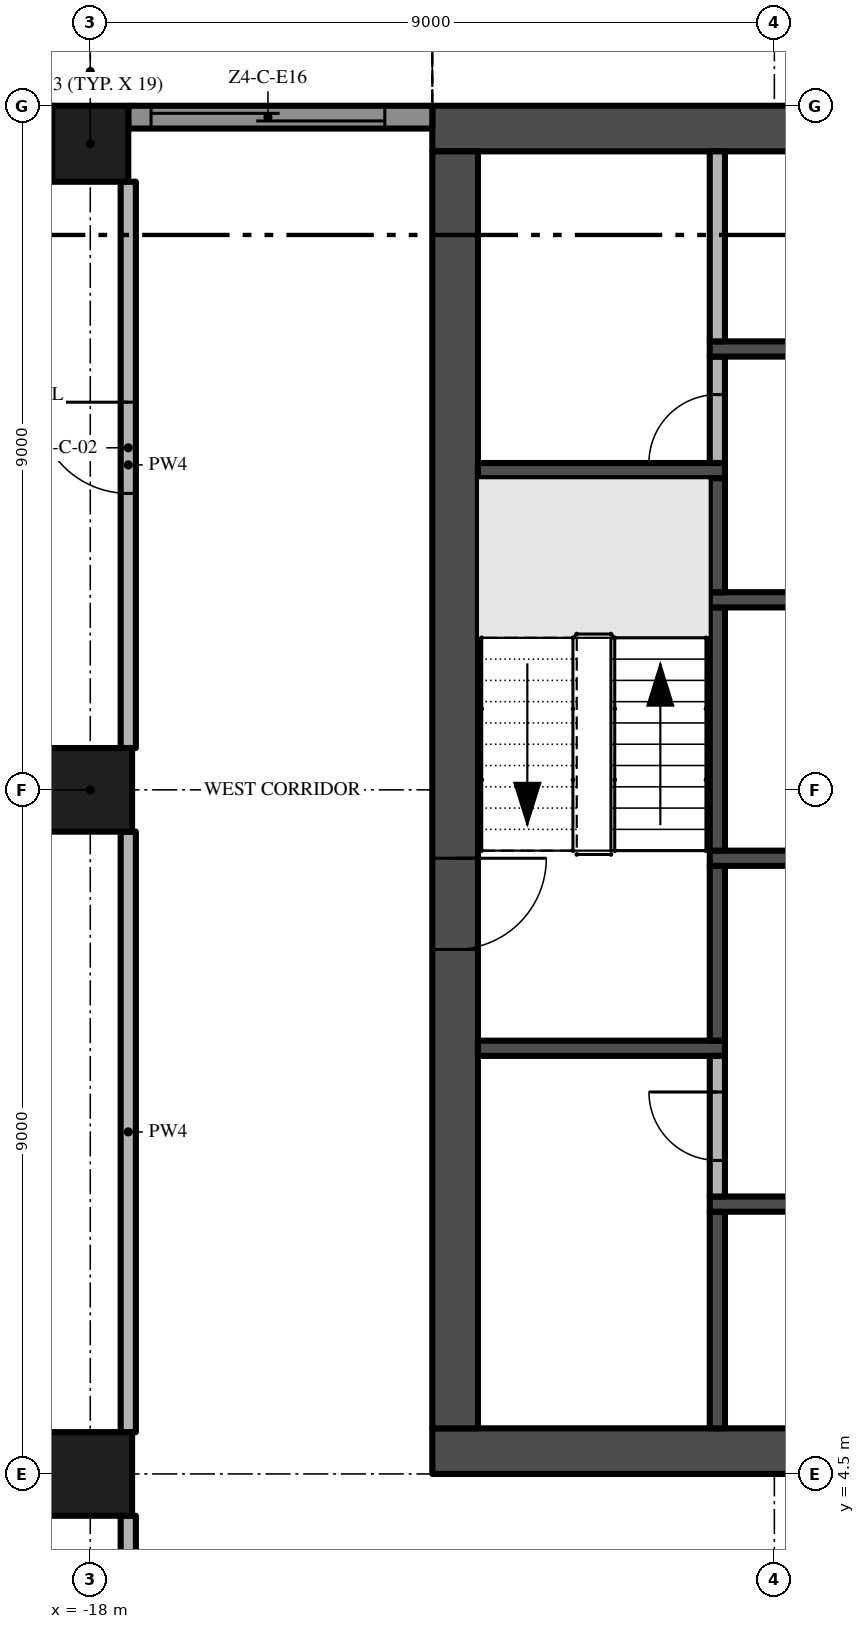
"""IFC4 building model, lengths in metres.
Left out: names, types, materials, properties, quantities, classifications, styles, units other than length and angle.
Written with IfcOpenShell. Run it as: python <this file> out.ifc"""

import sys

from ifc_helpers import new_model, si_unit, direction, frame, frame_2d, origin, origin_2d, place, context, subcontext, project, spatial, polyline, rectangle, outline, extrude, element, fill, save


model = new_model("IFC4")
c1 = context("Model", 3, precision=1e-05, world=origin(), true_north=direction((0.0, 1.0)))
c2 = subcontext(c1, "Body", "Model", "MODEL_VIEW")
j1 = project(units=[si_unit("LENGTHUNIT", "METRE"), si_unit("PLANEANGLEUNIT", "RADIAN")], contexts=[c1])
p1 = place(None, origin())
s1 = spatial("IfcSite", under=j1, at=p1, CompositionType="ELEMENT")
p2 = place(p1, origin())
s2 = spatial("IfcBuilding", under=s1, at=p2, CompositionType="ELEMENT")
p3 = place(p2, frame((0.0, 0.0, 214.8)))
s3 = spatial("IfcBuildingStorey", under=s2, at=p3, CompositionType="ELEMENT", Elevation=214.8)
p4 = place(p3, frame((-13.5, 4.8, -0.3), z_axis=(0.0, 0.0, 1.0), x_axis=(1.0, 0.0, 0.0)))
e1 = element("IfcWall", 1, at=p4, inside=s3, PredefinedType="SHEAR", context=c2, shape_type="SweptSolid", body=[
    extrude(rectangle(XDim=27.0, YDim=0.6, at=frame_2d((13.5, 0.0))), origin(), (0.0, 0.0, 1.0), 3.8),
])
p5 = place(p4, frame((12.0, 0.0, 0.3)))
e2 = element("IfcOpeningElement", 2, at=p5, cuts=e1, PredefinedType="OPENING", context=c2, shape_type="SweptSolid", body=[
    extrude(rectangle(XDim=3.0, YDim=2.4, at=frame_2d((1.5, 1.2))), frame((0.0, 0.31, 0.0), z_axis=(0.0, -1.0, 0.0), x_axis=(1.0, 0.0, 0.0)), (0.0, 0.0, 1.0), 0.62),
])
p6 = place(p4, frame((4.9, 0.0, 0.3)))
e3 = element("IfcOpeningElement", 3, at=p6, cuts=e1, PredefinedType="OPENING", context=c2, shape_type="SweptSolid", body=[
    extrude(rectangle(XDim=1.2, YDim=2.2, at=frame_2d((0.6, 1.1))), frame((0.0, 0.31, 0.0), z_axis=(0.0, -1.0, 0.0), x_axis=(1.0, 0.0, 0.0)), (0.0, 0.0, 1.0), 0.62),
])
p7 = place(p4, frame((20.75, 0.0, 0.3)))
e4 = element("IfcOpeningElement", 4, at=p7, cuts=e1, PredefinedType="OPENING", context=c2, shape_type="SweptSolid", body=[
    extrude(rectangle(XDim=1.5, YDim=2.2, at=frame_2d((0.75, 1.1))), frame((0.0, 0.31, 0.0), z_axis=(0.0, -1.0, 0.0), x_axis=(1.0, 0.0, 0.0)), (0.0, 0.0, 1.0), 0.62),
])
p8 = place(p4, frame((17.4, 0.0, 0.3)))
e5 = element("IfcOpeningElement", 5, at=p8, cuts=e1, PredefinedType="OPENING", context=c2, shape_type="SweptSolid", body=[
    extrude(rectangle(XDim=1.2, YDim=2.2, at=frame_2d((0.6, 1.1))), frame((0.0, 0.31, 0.0), z_axis=(0.0, -1.0, 0.0), x_axis=(1.0, 0.0, 0.0)), (0.0, 0.0, 1.0), 0.62),
])
p9 = place(p3, frame((13.5, 22.2, -0.3), z_axis=(0.0, 0.0, 1.0), x_axis=(-1.0, 0.0, 0.0)))
e6 = element("IfcWall", 6, at=p9, inside=s3, PredefinedType="SHEAR", context=c2, shape_type="SweptSolid", body=[
    extrude(rectangle(XDim=27.0, YDim=0.6, at=frame_2d((13.5, 0.0))), origin(), (0.0, 0.0, 1.0), 3.8),
])
p10 = place(p3, frame((-13.2, 21.9, -0.3), z_axis=(0.0, 0.0, 1.0), x_axis=(0.0, -1.0, 0.0)))
e7 = element("IfcWall", 7, at=p10, inside=s3, PredefinedType="SHEAR", context=c2, shape_type="SweptSolid", body=[
    extrude(rectangle(XDim=16.8, YDim=0.6, at=frame_2d((8.4, 0.0))), origin(), (0.0, 0.0, 1.0), 3.8),
])
p11 = place(p10, frame((9.3, 0.0, 0.3)))
e8 = element("IfcOpeningElement", 8, at=p11, cuts=e7, PredefinedType="OPENING", context=c2, shape_type="SweptSolid", body=[
    extrude(rectangle(XDim=1.2, YDim=2.2, at=frame_2d((0.6, 1.1))), frame((0.0, 0.31, 0.0), z_axis=(0.0, -1.0, 0.0), x_axis=(1.0, 0.0, 0.0)), (0.0, 0.0, 1.0), 0.62),
])
p12 = place(p3, frame((-18.0, 13.5, 0.0), z_axis=(0.0, 0.0, 1.0), x_axis=(1.0, 0.0, 0.0)))
e9 = element("IfcColumn", 9, at=p12, inside=s3, PredefinedType="COLUMN", context=c2, shape_type="SweptSolid", body=[
    extrude(rectangle(XDim=1.1, YDim=1.1, at=origin_2d()), origin(), (0.0, 0.0, 1.0), 3.5),
])
p13 = place(p3, frame((-18.0, 22.0, 0.0), z_axis=(0.0, 0.0, 1.0), x_axis=(1.0, 0.0, 0.0)))
e10 = element("IfcColumn", 10, at=p13, inside=s3, PredefinedType="COLUMN", context=c2, shape_type="SweptSolid", body=[
    extrude(rectangle(XDim=1.0, YDim=1.0, at=origin_2d()), origin(), (0.0, 0.0, 1.0), 3.5),
])
p14 = place(p3, frame((-18.0, 4.5, 0.0), z_axis=(0.0, 0.0, 1.0), x_axis=(1.0, 0.0, 0.0)))
e11 = element("IfcColumn", 11, at=p14, inside=s3, PredefinedType="COLUMN", context=c2, shape_type="SweptSolid", body=[
    extrude(rectangle(XDim=1.1, YDim=1.1, at=origin_2d()), origin(), (0.0, 0.0, 1.0), 3.5),
])
p15 = place(p3, frame((-17.5, 22.35, 0.0), z_axis=(0.0, 0.0, 1.0), x_axis=(1.0, 0.0, 0.0)))
e12 = element("IfcWall", 12, at=p15, inside=s3, PredefinedType="SOLIDWALL", context=c2, shape_type="SweptSolid", body=[
    extrude(rectangle(XDim=4.0, YDim=0.3, at=frame_2d((2.0, 0.0))), origin(), (0.0, 0.0, 1.0), 3.5),
])
p16 = place(p15, frame((0.3, 0.0, 0.0)))
e13 = element("IfcOpeningElement", 13, at=p16, cuts=e12, PredefinedType="OPENING", context=c2, shape_type="SweptSolid", body=[
    extrude(rectangle(XDim=3.075, YDim=2.4, at=frame_2d((1.538, 1.2))), frame((0.0, 0.16, 0.0), z_axis=(0.0, -1.0, 0.0), x_axis=(1.0, 0.0, 0.0)), (0.0, 0.0, 1.0), 0.32),
])
p17 = place(p3, origin())
e14 = element("IfcWall", 14, at=p17, inside=s3, PredefinedType="USERDEFINED", context=c2, shape_type="SweptSolid", body=[
    extrude(outline(polyline([(-13.5, 25.149), (-15.0, 25.485), (-15.375, 25.5), (-16.5, 25.369), (-18.0, 24.845), (-19.5, 24.112), (-21.0, 23.451), (-22.5, 23.115), (-22.445, 22.871), (-20.921, 23.213), (-19.395, 23.885), (-17.904, 24.614), (-16.444, 25.124), (-15.365, 25.249), (-15.033, 25.236), (-13.555, 24.905), (-13.5, 25.149)])), origin(), (0.0, 0.0, 1.0), 0.9),
])
for number, where, z_axis, x_axis in (
    (15, (-12.9, 10.1, 0.0), (0.0, 0.0, 1.0), (1.0, 0.0, 0.0)),
    (16, (-12.9, 17.7, 0.0), (0.0, 0.0, 1.0), (1.0, 0.0, 0.0)),
):
    element("IfcWall", number, at=place(p3, frame(where, z_axis=z_axis, x_axis=x_axis)), inside=s3, PredefinedType="SHEAR", context=c2, shape_type="SweptSolid", body=[
        extrude(rectangle(XDim=3.25, YDim=0.2, at=frame_2d((1.625, 0.0))), origin(), (0.0, 0.0, 1.0), 3.5),
    ])
p18 = place(p3, frame((-9.75, 5.1, 0.0), z_axis=(0.0, 0.0, 1.0), x_axis=(0.0, 1.0, 0.0)))
e17 = element("IfcWall", 17, at=p18, inside=s3, PredefinedType="SHEAR", context=c2, shape_type="SweptSolid", body=[
    extrude(rectangle(XDim=2.85, YDim=0.2, at=frame_2d((1.425, 0.0))), origin(), (0.0, 0.0, 1.0), 3.5),
])
p19 = place(p3, frame((-9.85, 8.05, 0.0), z_axis=(0.0, 0.0, 1.0), x_axis=(1.0, 0.0, 0.0)))
e18 = element("IfcWall", 18, at=p19, inside=s3, PredefinedType="SHEAR", context=c2, shape_type="SweptSolid", body=[
    extrude(rectangle(XDim=8.35, YDim=0.2, at=frame_2d((4.175, 0.0))), origin(), (0.0, 0.0, 1.0), 3.5),
])
p20 = place(p3, frame((-9.75, 8.15, 0.0), z_axis=(0.0, 0.0, 1.0), x_axis=(0.0, 1.0, 0.0)))
e19 = element("IfcWall", 19, at=p20, inside=s3, PredefinedType="PARTITIONING", context=c2, shape_type="SweptSolid", body=[
    extrude(rectangle(XDim=1.85, YDim=0.2, at=frame_2d((0.925, 0.0))), origin(), (0.0, 0.0, 1.0), 3.5),
])
p21 = place(p20, frame((0.475, 0.0, 0.0)))
e20 = element("IfcOpeningElement", 20, at=p21, cuts=e19, PredefinedType="OPENING", context=c2, shape_type="SweptSolid", body=[
    extrude(rectangle(XDim=0.9, YDim=2.1, at=frame_2d((0.45, 1.05))), frame((0.0, 0.11, 0.0), z_axis=(0.0, -1.0, 0.0), x_axis=(1.0, 0.0, 0.0)), (0.0, 0.0, 1.0), 0.22),
])
p22 = place(p3, frame((-9.75, 10.2, 0.0), z_axis=(0.0, 0.0, 1.0), x_axis=(0.0, 1.0, 0.0)))
e21 = element("IfcWall", 21, at=p22, inside=s3, PredefinedType="SHEAR", context=c2, shape_type="SweptSolid", body=[
    extrude(rectangle(XDim=2.3, YDim=0.2, at=frame_2d((1.15, 0.0))), origin(), (0.0, 0.0, 1.0), 3.5),
])
p23 = place(p3, frame((-9.85, 12.6, 0.0), z_axis=(0.0, 0.0, 1.0), x_axis=(1.0, 0.0, 0.0)))
e22 = element("IfcWall", 22, at=p23, inside=s3, PredefinedType="SHEAR", context=c2, shape_type="SweptSolid", body=[
    extrude(rectangle(XDim=3.475, YDim=0.2, at=frame_2d((1.738, 0.0))), origin(), (0.0, 0.0, 1.0), 3.5),
])
p24 = place(p3, frame((-9.75, 12.7, 0.0), z_axis=(0.0, 0.0, 1.0), x_axis=(0.0, 1.0, 0.0)))
e23 = element("IfcWall", 23, at=p24, inside=s3, PredefinedType="SHEAR", context=c2, shape_type="SweptSolid", body=[
    extrude(rectangle(XDim=3.2, YDim=0.2, at=frame_2d((1.6, 0.0))), origin(), (0.0, 0.0, 1.0), 3.5),
])
p25 = place(p3, frame((-1.5, 16.0, 0.0), z_axis=(0.0, 0.0, 1.0), x_axis=(-1.0, 0.0, 0.0)))
e24 = element("IfcWall", 24, at=p25, inside=s3, PredefinedType="SHEAR", context=c2, shape_type="SweptSolid", body=[
    extrude(rectangle(XDim=8.35, YDim=0.2, at=frame_2d((4.175, 0.0))), origin(), (0.0, 0.0, 1.0), 3.5),
])
p26 = place(p25, frame((6.162, 0.0, 0.0)))
e25 = element("IfcOpeningElement", 25, at=p26, cuts=e24, PredefinedType="OPENING", context=c2, shape_type="SweptSolid", body=[
    extrude(rectangle(XDim=0.9, YDim=2.1, at=frame_2d((0.45, 1.05))), frame((0.0, 0.11, 0.0), z_axis=(0.0, -1.0, 0.0), x_axis=(1.0, 0.0, 0.0)), (0.0, 0.0, 1.0), 0.22),
])
p27 = place(p3, frame((-9.75, 16.1, 0.0), z_axis=(0.0, 0.0, 1.0), x_axis=(0.0, 1.0, 0.0)))
e26 = element("IfcWall", 26, at=p27, inside=s3, PredefinedType="SHEAR", context=c2, shape_type="SweptSolid", body=[
    extrude(rectangle(XDim=1.5, YDim=0.2, at=frame_2d((0.75, 0.0))), origin(), (0.0, 0.0, 1.0), 3.5),
])
p28 = place(p3, frame((-9.75, 17.8, 0.0), z_axis=(0.0, 0.0, 1.0), x_axis=(0.0, 1.0, 0.0)))
e27 = element("IfcWall", 27, at=p28, inside=s3, PredefinedType="PARTITIONING", context=c2, shape_type="SweptSolid", body=[
    extrude(rectangle(XDim=1.4, YDim=0.2, at=frame_2d((0.7, 0.0))), origin(), (0.0, 0.0, 1.0), 3.5),
])
p29 = place(p28, origin())
e28 = element("IfcOpeningElement", 28, at=p29, cuts=e27, PredefinedType="OPENING", context=c2, shape_type="SweptSolid", body=[
    extrude(rectangle(XDim=0.9, YDim=2.1, at=frame_2d((0.45, 1.05))), frame((0.0, 0.11, 0.0), z_axis=(0.0, -1.0, 0.0), x_axis=(1.0, 0.0, 0.0)), (0.0, 0.0, 1.0), 0.22),
])
p30 = place(p3, frame((-9.85, 19.3, 0.0), z_axis=(0.0, 0.0, 1.0), x_axis=(1.0, 0.0, 0.0)))
e29 = element("IfcWall", 29, at=p30, inside=s3, PredefinedType="SHEAR", context=c2, shape_type="SweptSolid", body=[
    extrude(rectangle(XDim=19.7, YDim=0.2, at=frame_2d((9.85, 0.0))), origin(), (0.0, 0.0, 1.0), 3.5),
])
p31 = place(p30, frame((10.519, 0.0, 0.0)))
e30 = element("IfcOpeningElement", 30, at=p31, cuts=e29, PredefinedType="OPENING", context=c2, shape_type="SweptSolid", body=[
    extrude(rectangle(XDim=1.1, YDim=2.1, at=frame_2d((0.55, 1.05))), frame((0.0, 0.11, 0.0), z_axis=(0.0, -1.0, 0.0), x_axis=(1.0, 0.0, 0.0)), (0.0, 0.0, 1.0), 0.22),
])
p32 = place(p30, frame((12.956, 0.0, 0.0)))
e31 = element("IfcOpeningElement", 31, at=p32, cuts=e29, PredefinedType="OPENING", context=c2, shape_type="SweptSolid", body=[
    extrude(rectangle(XDim=1.1, YDim=2.1, at=frame_2d((0.55, 1.05))), frame((0.0, 0.11, 0.0), z_axis=(0.0, -1.0, 0.0), x_axis=(1.0, 0.0, 0.0)), (0.0, 0.0, 1.0), 0.22),
])
p33 = place(p30, frame((15.394, 0.0, 0.0)))
e32 = element("IfcOpeningElement", 32, at=p33, cuts=e29, PredefinedType="OPENING", context=c2, shape_type="SweptSolid", body=[
    extrude(rectangle(XDim=1.1, YDim=2.1, at=frame_2d((0.55, 1.05))), frame((0.0, 0.11, 0.0), z_axis=(0.0, -1.0, 0.0), x_axis=(1.0, 0.0, 0.0)), (0.0, 0.0, 1.0), 0.22),
])
p34 = place(p30, frame((17.831, 0.0, 0.0)))
e33 = element("IfcOpeningElement", 33, at=p34, cuts=e29, PredefinedType="OPENING", context=c2, shape_type="SweptSolid", body=[
    extrude(rectangle(XDim=1.1, YDim=2.1, at=frame_2d((0.55, 1.05))), frame((0.0, 0.11, 0.0), z_axis=(0.0, -1.0, 0.0), x_axis=(1.0, 0.0, 0.0)), (0.0, 0.0, 1.0), 0.22),
])
p35 = place(p30, frame((3.306, 0.0, 0.0)))
e34 = element("IfcOpeningElement", 34, at=p35, cuts=e29, PredefinedType="OPENING", context=c2, shape_type="SweptSolid", body=[
    extrude(rectangle(XDim=0.9, YDim=2.1, at=frame_2d((0.45, 1.05))), frame((0.0, 0.11, 0.0), z_axis=(0.0, -1.0, 0.0), x_axis=(1.0, 0.0, 0.0)), (0.0, 0.0, 1.0), 0.22),
])
p36 = place(p30, frame((8.181, 0.0, 0.0)))
e35 = element("IfcOpeningElement", 35, at=p36, cuts=e29, PredefinedType="OPENING", context=c2, shape_type="SweptSolid", body=[
    extrude(rectangle(XDim=0.9, YDim=2.1, at=frame_2d((0.45, 1.05))), frame((0.0, 0.11, 0.0), z_axis=(0.0, -1.0, 0.0), x_axis=(1.0, 0.0, 0.0)), (0.0, 0.0, 1.0), 0.22),
])
p37 = place(p3, frame((-9.75, 19.4, 0.0), z_axis=(0.0, 0.0, 1.0), x_axis=(0.0, 1.0, 0.0)))
e36 = element("IfcWall", 36, at=p37, inside=s3, PredefinedType="PARTITIONING", context=c2, shape_type="SweptSolid", body=[
    extrude(rectangle(XDim=2.5, YDim=0.2, at=frame_2d((1.25, 0.0))), origin(), (0.0, 0.0, 1.0), 3.5),
])
p38 = place(p3, frame((-17.5, -0.2, 0.0), z_axis=(0.0, 0.0, 1.0), x_axis=(0.0, 1.0, 0.0)))
e37 = element("IfcWall", 37, at=p38, inside=s3, PredefinedType="PARTITIONING", context=c2, shape_type="SweptSolid", body=[
    extrude(rectangle(XDim=4.15, YDim=0.2, at=frame_2d((2.075, 0.0))), origin(), (0.0, 0.0, 1.0), 3.5),
])
p39 = place(p3, frame((-17.5, 5.05, 0.0), z_axis=(0.0, 0.0, 1.0), x_axis=(0.0, 1.0, 0.0)))
e38 = element("IfcWall", 38, at=p39, inside=s3, PredefinedType="PARTITIONING", context=c2, shape_type="SweptSolid", body=[
    extrude(rectangle(XDim=7.9, YDim=0.2, at=frame_2d((3.95, 0.0))), origin(), (0.0, 0.0, 1.0), 3.5),
])
p40 = place(p3, frame((-17.5, 14.05, 0.0), z_axis=(0.0, 0.0, 1.0), x_axis=(0.0, 1.0, 0.0)))
e39 = element("IfcWall", 39, at=p40, inside=s3, PredefinedType="PARTITIONING", context=c2, shape_type="SweptSolid", body=[
    extrude(rectangle(XDim=7.45, YDim=0.2, at=frame_2d((3.725, 0.0))), origin(), (0.0, 0.0, 1.0), 3.5),
])
p41 = place(p40, frame((3.35, 0.0, 0.0)))
e40 = element("IfcOpeningElement", 40, at=p41, cuts=e39, PredefinedType="OPENING", context=c2, shape_type="SweptSolid", body=[
    extrude(rectangle(XDim=1.2, YDim=2.4, at=frame_2d((0.6, 1.2))), frame((0.0, 0.11, 0.0), z_axis=(0.0, -1.0, 0.0), x_axis=(1.0, 0.0, 0.0)), (0.0, 0.0, 1.0), 0.22),
])
p42 = place(p16, origin())
e41 = element("IfcDoor", 41, at=p42, inside=s3, OperationType="SINGLE_SWING_LEFT", PredefinedType="DOOR", context=c2, shape_type="SweptSolid", body=[
    extrude(rectangle(XDim=3.075, YDim=2.4, at=frame_2d((1.538, 1.2))), frame((0.0, 0.025, 0.0), z_axis=(0.0, -1.0, 0.0), x_axis=(1.0, 0.0, 0.0)), (0.0, 0.0, 1.0), 0.05),
])
fill(e13, e41)
p43 = place(p11, frame((1.2, 0.0, 0.0), z_axis=(0.0, 0.0, 1.0), x_axis=(-1.0, 0.0, 0.0)))
e42 = element("IfcDoor", 42, at=p43, inside=s3, OperationType="SINGLE_SWING_RIGHT", PredefinedType="DOOR", context=c2, shape_type="SweptSolid", body=[
    extrude(rectangle(XDim=1.2, YDim=2.2, at=frame_2d((0.6, 1.1))), frame((0.0, 0.025, 0.0), z_axis=(0.0, -1.0, 0.0), x_axis=(1.0, 0.0, 0.0)), (0.0, 0.0, 1.0), 0.05),
])
fill(e8, e42)
p44 = place(p29, origin())
e43 = element("IfcDoor", 43, at=p44, inside=s3, OperationType="SINGLE_SWING_LEFT", PredefinedType="DOOR", context=c2, shape_type="SweptSolid", body=[
    extrude(rectangle(XDim=0.9, YDim=2.1, at=frame_2d((0.45, 1.05))), frame((0.0, 0.025, 0.0), z_axis=(0.0, -1.0, 0.0), x_axis=(1.0, 0.0, 0.0)), (0.0, 0.0, 1.0), 0.05),
])
fill(e28, e43)
p45 = place(p21, origin())
e44 = element("IfcDoor", 44, at=p45, inside=s3, OperationType="SINGLE_SWING_RIGHT", PredefinedType="DOOR", context=c2, shape_type="SweptSolid", body=[
    extrude(rectangle(XDim=0.9, YDim=2.1, at=frame_2d((0.45, 1.05))), frame((0.0, 0.025, 0.0), z_axis=(0.0, -1.0, 0.0), x_axis=(1.0, 0.0, 0.0)), (0.0, 0.0, 1.0), 0.05),
])
fill(e20, e44)
p46 = place(p41, origin())
e45 = element("IfcDoor", 45, at=p46, inside=s3, OperationType="SINGLE_SWING_RIGHT", PredefinedType="DOOR", context=c2, shape_type="SweptSolid", body=[
    extrude(rectangle(XDim=1.2, YDim=2.4, at=frame_2d((0.6, 1.2))), frame((0.0, 0.025, 0.0), z_axis=(0.0, -1.0, 0.0), x_axis=(1.0, 0.0, 0.0)), (0.0, 0.0, 1.0), 0.05),
])
fill(e40, e45)
save(model, sys.argv[1])
